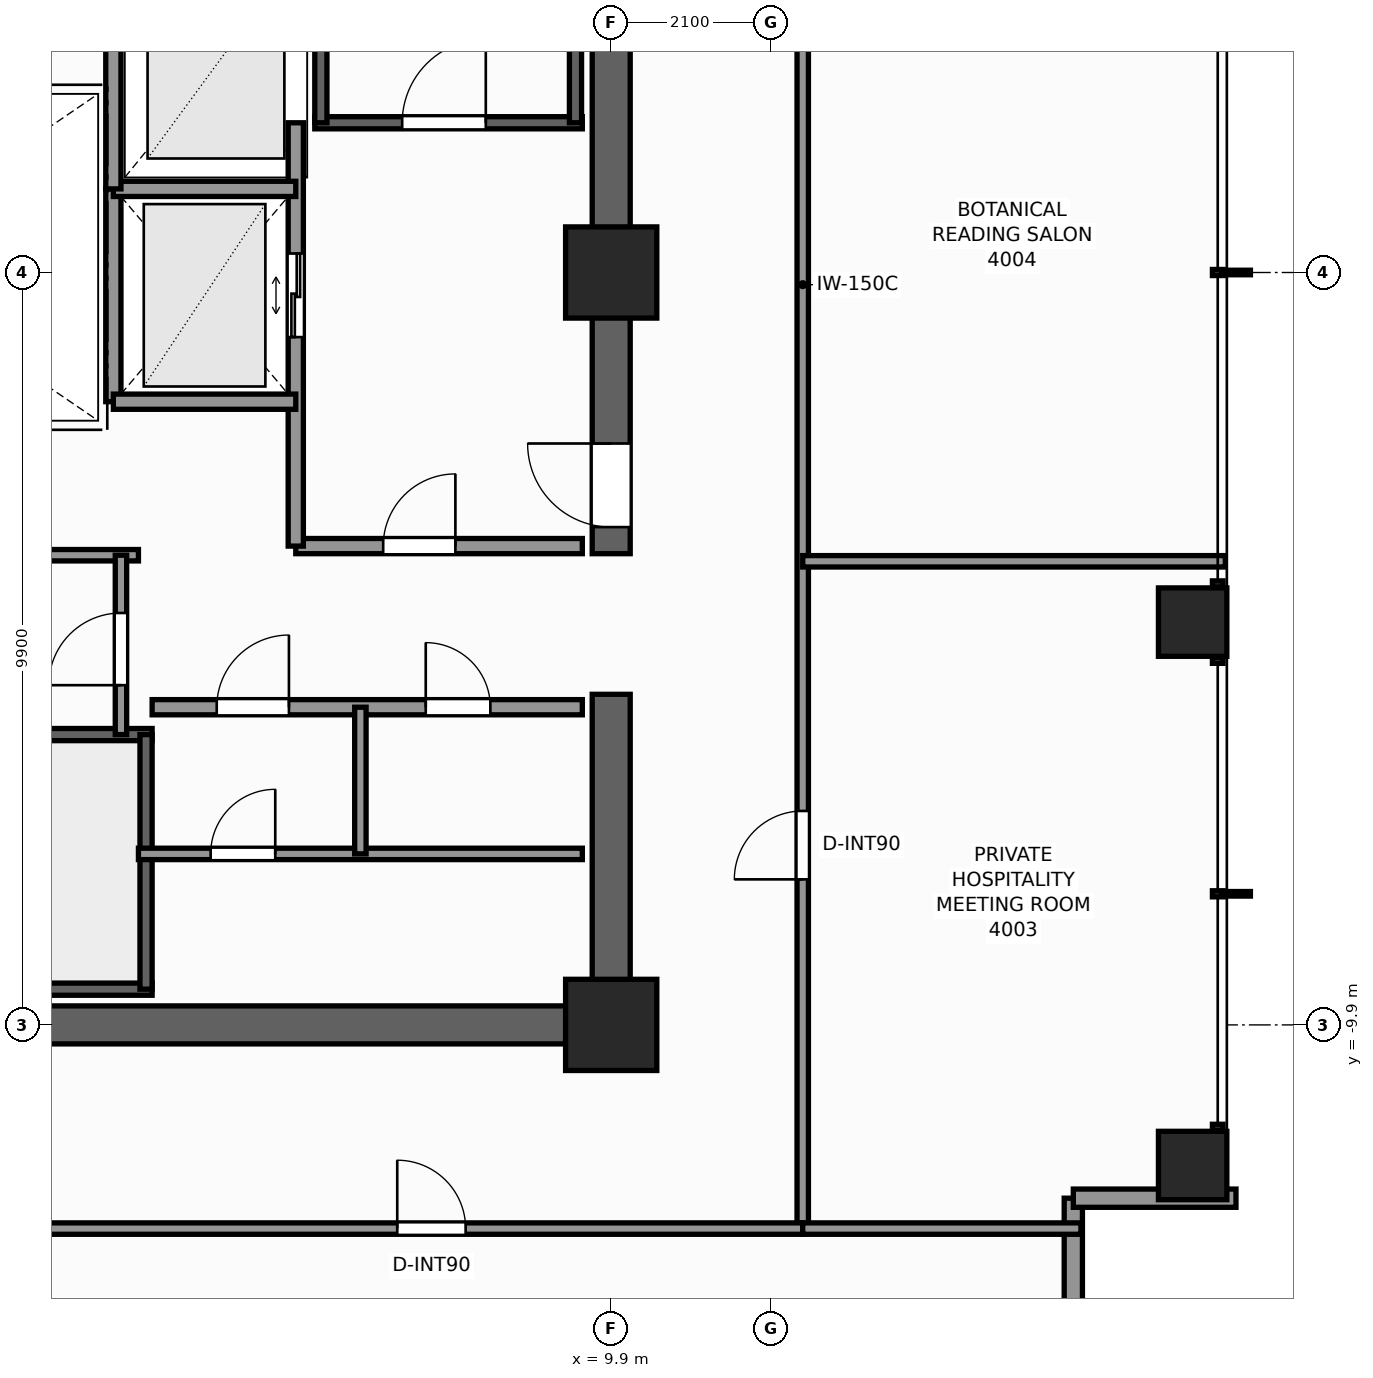
"""IFC4 building model, lengths in metres.
Left out: names, types, materials, properties, quantities, classifications, styles, units other than length and angle.
Written with IfcOpenShell. Run it as: python <this file> out.ifc"""

import sys

from ifc_helpers import new_model, si_unit, direction, frame, frame_2d, origin, origin_2d, place, context, subcontext, project, spatial, rectangle, extrude, element, fill, save


model = new_model("IFC4")
c1 = context("Model", 3, precision=1e-05, world=origin(), true_north=direction((0.0, 1.0)))
c2 = subcontext(c1, "Body", "Model", "MODEL_VIEW")
j1 = project(units=[si_unit("LENGTHUNIT", "METRE"), si_unit("PLANEANGLEUNIT", "RADIAN")], contexts=[c1])
p1 = place(None, origin())
s1 = spatial("IfcSite", under=j1, at=p1, CompositionType="ELEMENT")
p2 = place(p1, origin())
s2 = spatial("IfcBuilding", under=s1, at=p2, CompositionType="ELEMENT")
p3 = place(p2, frame((0.0, 0.0, 138.2)))
s3 = spatial("IfcBuildingStorey", under=s2, at=p3, CompositionType="ELEMENT", Elevation=138.2)
p4 = place(p3, frame((10.15, -9.9, 0.0), z_axis=(0.0, 0.0, 1.0), x_axis=(-1.0, 0.0, 0.0)))
e1 = element("IfcWall", 1, at=p4, inside=s3, PredefinedType="SHEAR", context=c2, shape_type="SweptSolid", body=[
    extrude(rectangle(XDim=12.01, YDim=0.5, at=frame_2d((6.005, 0.0))), origin(), (0.0, 0.0, 1.0), 3.3),
])
p5 = place(p3, frame((9.9, -9.65, 0.0), z_axis=(0.0, 0.0, 1.0), x_axis=(0.0, 1.0, 0.0)))
e2 = element("IfcWall", 2, at=p5, inside=s3, PredefinedType="SHEAR", context=c2, shape_type="SweptSolid", body=[
    extrude(rectangle(XDim=4.1, YDim=0.5, at=frame_2d((2.05, 0.0))), origin(), (0.0, 0.0, 1.0), 3.3),
])
p6 = place(p3, frame((9.9, -3.7, 0.0), z_axis=(0.0, 0.0, 1.0), x_axis=(0.0, 1.0, 0.0)))
e3 = element("IfcWall", 3, at=p6, inside=s3, PredefinedType="SHEAR", context=c2, shape_type="SweptSolid", body=[
    extrude(rectangle(XDim=13.35, YDim=0.5, at=frame_2d((6.675, 0.0))), origin(), (0.0, 0.0, 1.0), 3.3),
])
p7 = place(p6, frame((0.35, 0.0, 0.0)))
e4 = element("IfcOpeningElement", 4, at=p7, cuts=e3, PredefinedType="OPENING", context=c2, shape_type="SweptSolid", body=[
    extrude(rectangle(XDim=1.1, YDim=2.2, at=frame_2d((0.55, 1.1))), frame((0.0, 0.26, 0.0), z_axis=(0.0, -1.0, 0.0), x_axis=(1.0, 0.0, 0.0)), (0.0, 0.0, 1.0), 0.52),
])
for number, where, z_axis, x_axis in (
    (5, (9.9, -9.9, 0.0), (0.0, 0.0, 1.0), (1.0, 0.0, 0.0)),
    (6, (9.9, 0.0, 0.0), (0.0, 0.0, 1.0), (1.0, 0.0, 0.0)),
):
    element("IfcColumn", number, at=place(p3, frame(where, z_axis=z_axis, x_axis=x_axis)), inside=s3, PredefinedType="COLUMN", context=c2, shape_type="SweptSolid", body=[
        extrude(rectangle(XDim=1.2, YDim=1.2, at=origin_2d()), origin(), (0.0, 0.0, 1.0), 3.3),
    ])
for number, where, z_axis, x_axis in (
    (7, (17.55, -11.75, 0.0), (0.0, 0.0, 1.0), (1.0, 0.0, 0.0)),
    (8, (17.55, -4.6, 0.0), (0.0, 0.0, 1.0), (1.0, 0.0, 0.0)),
):
    element("IfcColumn", number, at=place(p3, frame(where, z_axis=z_axis, x_axis=x_axis)), inside=s3, PredefinedType="COLUMN", context=c2, shape_type="SweptSolid", body=[
        extrude(rectangle(XDim=0.9, YDim=0.9, at=origin_2d()), origin(), (0.0, 0.0, 1.0), 3.3),
    ])
for number, where, z_axis, x_axis in (
    (9, (15.98, -12.18, 0.0), (0.0, 0.0, 1.0), (0.0, -1.0, 0.0)),
    (10, (18.12, -12.18, 0.0), (0.0, 0.0, 1.0), (-1.0, 0.0, 0.0)),
):
    element("IfcWall", number, at=place(p3, frame(where, z_axis=z_axis, x_axis=x_axis)), inside=s3, PredefinedType="STANDARD", context=c2, shape_type="SweptSolid", body=[
        extrude(rectangle(XDim=2.14, YDim=0.24, at=frame_2d((1.07, 0.0))), origin(), (0.0, 0.0, 1.0), 2.479),
    ])
p8 = place(p3, frame((6.0, 1.97, 0.0), z_axis=(0.0, 0.0, 1.0), x_axis=(1.0, 0.0, 0.0)))
e11 = element("IfcWall", 11, at=p8, inside=s3, PredefinedType="SHEAR", context=c2, shape_type="SweptSolid", body=[
    extrude(rectangle(XDim=3.52, YDim=0.16, at=frame_2d((1.76, 0.0))), origin(), (0.0, 0.0, 1.0), 3.3),
])
p9 = place(p8, frame((1.15, 0.0, 0.0)))
e12 = element("IfcOpeningElement", 12, at=p9, cuts=e11, PredefinedType="OPENING", context=c2, shape_type="SweptSolid", body=[
    extrude(rectangle(XDim=1.1, YDim=2.2, at=frame_2d((0.55, 1.1))), frame((0.0, 0.09, 0.0), z_axis=(0.0, -1.0, 0.0), x_axis=(1.0, 0.0, 0.0)), (0.0, 0.0, 1.0), 0.18),
])
for number, where, z_axis, x_axis in (
    (13, (6.08, 1.97, 0.0), (0.0, 0.0, 1.0), (0.0, 1.0, 0.0)),
    (14, (9.43, 1.97, 0.0), (0.0, 0.0, 1.0), (0.0, 1.0, 0.0)),
):
    element("IfcWall", number, at=place(p3, frame(where, z_axis=z_axis, x_axis=x_axis)), inside=s3, PredefinedType="SHEAR", context=c2, shape_type="SweptSolid", body=[
        extrude(rectangle(XDim=7.56, YDim=0.16, at=frame_2d((3.78, 0.0))), origin(), (0.0, 0.0, 1.0), 3.3),
    ])
p10 = place(p3, frame((3.86, -9.43, 0.0), z_axis=(0.0, 0.0, 1.0), x_axis=(-1.0, 0.0, 0.0)))
e15 = element("IfcWall", 15, at=p10, inside=s3, PredefinedType="SHEAR", context=c2, shape_type="SweptSolid", body=[
    extrude(rectangle(XDim=7.72, YDim=0.16, at=frame_2d((3.86, 0.0))), origin(), (0.0, 0.0, 1.0), 3.3),
])
p11 = place(p10, frame((6.01, 0.0, 0.0)))
e16 = element("IfcOpeningElement", 16, at=p11, cuts=e15, PredefinedType="OPENING", context=c2, shape_type="SweptSolid", body=[
    extrude(rectangle(XDim=1.1, YDim=2.2, at=frame_2d((0.55, 1.1))), frame((0.0, 0.09, 0.0), z_axis=(0.0, -1.0, 0.0), x_axis=(1.0, 0.0, 0.0)), (0.0, 0.0, 1.0), 0.18),
])
p12 = place(p3, frame((-3.86, -6.08, 0.0), z_axis=(0.0, 0.0, 1.0), x_axis=(1.0, 0.0, 0.0)))
e17 = element("IfcWall", 17, at=p12, inside=s3, PredefinedType="SHEAR", context=c2, shape_type="SweptSolid", body=[
    extrude(rectangle(XDim=7.72, YDim=0.16, at=frame_2d((3.86, 0.0))), origin(), (0.0, 0.0, 1.0), 3.3),
])
p13 = place(p3, frame((3.78, -9.43, 0.0), z_axis=(0.0, 0.0, 1.0), x_axis=(0.0, 1.0, 0.0)))
e18 = element("IfcWall", 18, at=p13, inside=s3, PredefinedType="SHEAR", context=c2, shape_type="SweptSolid", body=[
    extrude(rectangle(XDim=3.35, YDim=0.16, at=frame_2d((1.675, 0.0))), origin(), (0.0, 0.0, 1.0), 3.3),
])
p14 = place(p3, frame((5.75, -3.6, 0.0), z_axis=(0.0, 0.0, 1.0), x_axis=(1.0, 0.0, 0.0)))
e19 = element("IfcWall", 19, at=p14, inside=s3, PredefinedType="SOLIDWALL", context=c2, shape_type="SweptSolid", body=[
    extrude(rectangle(XDim=3.77, YDim=0.2, at=frame_2d((1.885, 0.0))), origin(), (0.0, 0.0, 1.0), 3.1),
])
p15 = place(p14, frame((1.15, 0.0, 0.0)))
e20 = element("IfcOpeningElement", 20, at=p15, cuts=e19, PredefinedType="OPENING", context=c2, shape_type="SweptSolid", body=[
    extrude(rectangle(XDim=0.95, YDim=2.06, at=frame_2d((0.475, 1.03))), frame((0.0, 0.11, 0.0), z_axis=(0.0, -1.0, 0.0), x_axis=(1.0, 0.0, 0.0)), (0.0, 0.0, 1.0), 0.22),
])
p16 = place(p3, frame((5.75, -3.6, 0.0), z_axis=(0.0, 0.0, 1.0), x_axis=(0.0, 1.0, 0.0)))
e21 = element("IfcWall", 21, at=p16, inside=s3, PredefinedType="SOLIDWALL", context=c2, shape_type="SweptSolid", body=[
    extrude(rectangle(XDim=5.57, YDim=0.2, at=frame_2d((2.785, 0.0))), origin(), (0.0, 0.0, 1.0), 2.735),
])
p17 = place(p16, frame((2.75, 0.0, 0.0)))
e22 = element("IfcOpeningElement", 22, at=p17, cuts=e21, PredefinedType="OPENING", context=c2, shape_type="SweptSolid", body=[
    extrude(rectangle(XDim=1.1, YDim=2.2, at=frame_2d((0.55, 1.1))), frame((0.0, 0.11, 0.0), z_axis=(0.0, -1.0, 0.0), x_axis=(1.0, 0.0, 0.0)), (0.0, 0.0, 1.0), 0.22),
])
p18 = place(p3, frame((3.35, -1.7, 0.0), z_axis=(0.0, 0.0, 1.0), x_axis=(0.0, 1.0, 0.0)))
e23 = element("IfcWall", 23, at=p18, inside=s3, PredefinedType="SOLIDWALL", context=c2, shape_type="SweptSolid", body=[
    extrude(rectangle(XDim=2.8, YDim=0.2, at=frame_2d((1.4, 0.0))), origin(), (0.0, 0.0, 1.0), 2.735),
])
for number, where, z_axis, x_axis in (
    (24, (3.35, -1.7, 0.0), (0.0, 0.0, 1.0), (1.0, 0.0, 0.0)),
    (25, (3.35, 1.1, 0.0), (0.0, 0.0, 1.0), (1.0, 0.0, 0.0)),
):
    element("IfcWall", number, at=place(p3, frame(where, z_axis=z_axis, x_axis=x_axis)), inside=s3, PredefinedType="SOLIDWALL", context=c2, shape_type="SweptSolid", body=[
        extrude(rectangle(XDim=2.4, YDim=0.2, at=frame_2d((1.2, 0.0))), origin(), (0.0, 0.0, 1.0), 3.1),
    ])
p19 = place(p3, frame((3.35, 1.1, 0.0), z_axis=(0.0, 0.0, 1.0), x_axis=(0.0, 1.0, 0.0)))
e26 = element("IfcWall", 26, at=p19, inside=s3, PredefinedType="SOLIDWALL", context=c2, shape_type="SweptSolid", body=[
    extrude(rectangle(XDim=3.2, YDim=0.2, at=frame_2d((1.6, 0.0))), origin(), (0.0, 0.0, 1.0), 2.735),
])
p20 = place(p3, frame((3.86, -5.72, 0.0), z_axis=(0.0, 0.0, 1.0), x_axis=(1.0, 0.0, 0.0)))
e27 = element("IfcWall", 27, at=p20, inside=s3, PredefinedType="SOLIDWALL", context=c2, shape_type="SweptSolid", body=[
    extrude(rectangle(XDim=5.66, YDim=0.2, at=frame_2d((2.83, 0.0))), origin(), (0.0, 0.0, 1.0), 3.1),
])
p21 = place(p20, frame((0.85, 0.0, 0.0)))
e28 = element("IfcOpeningElement", 28, at=p21, cuts=e27, PredefinedType="OPENING", context=c2, shape_type="SweptSolid", body=[
    extrude(rectangle(XDim=0.95, YDim=2.06, at=frame_2d((0.475, 1.03))), frame((0.0, 0.11, 0.0), z_axis=(0.0, -1.0, 0.0), x_axis=(1.0, 0.0, 0.0)), (0.0, 0.0, 1.0), 0.22),
])
p22 = place(p20, frame((3.6, 0.0, 0.0)))
e29 = element("IfcOpeningElement", 29, at=p22, cuts=e27, PredefinedType="OPENING", context=c2, shape_type="SweptSolid", body=[
    extrude(rectangle(XDim=0.85, YDim=2.03, at=frame_2d((0.425, 1.015))), frame((0.0, 0.11, 0.0), z_axis=(0.0, -1.0, 0.0), x_axis=(1.0, 0.0, 0.0)), (0.0, 0.0, 1.0), 0.22),
])
p23 = place(p3, frame((3.68, -7.65, 0.0), z_axis=(0.0, 0.0, 1.0), x_axis=(1.0, 0.0, 0.0)))
e30 = element("IfcWall", 30, at=p23, inside=s3, PredefinedType="PARTITIONING", context=c2, shape_type="SweptSolid", body=[
    extrude(rectangle(XDim=5.84, YDim=0.15, at=frame_2d((2.92, 0.0))), origin(), (0.0, 0.0, 1.0), 3.1),
])
p24 = place(p23, frame((0.95, 0.0, 0.0)))
e31 = element("IfcOpeningElement", 31, at=p24, cuts=e30, PredefinedType="OPENING", context=c2, shape_type="SweptSolid", body=[
    extrude(rectangle(XDim=0.85, YDim=2.03, at=frame_2d((0.425, 1.015))), frame((0.0, 0.085, 0.0), z_axis=(0.0, -1.0, 0.0), x_axis=(1.0, 0.0, 0.0)), (0.0, 0.0, 1.0), 0.17),
])
p25 = place(p3, frame((6.6, -7.65, 0.0), z_axis=(0.0, 0.0, 1.0), x_axis=(0.0, 1.0, 0.0)))
e32 = element("IfcWall", 32, at=p25, inside=s3, PredefinedType="PARTITIONING", context=c2, shape_type="SweptSolid", body=[
    extrude(rectangle(XDim=1.93, YDim=0.15, at=frame_2d((0.965, 0.0))), origin(), (0.0, 0.0, 1.0), 3.1),
])
p26 = place(p3, frame((-3.68, -3.72, 0.0), z_axis=(0.0, 0.0, 1.0), x_axis=(1.0, 0.0, 0.0)))
e33 = element("IfcWall", 33, at=p26, inside=s3, PredefinedType="PARTITIONING", context=c2, shape_type="SweptSolid", body=[
    extrude(rectangle(XDim=7.36, YDim=0.15, at=frame_2d((3.68, 0.0))), origin(), (0.0, 0.0, 1.0), 3.1),
])
p27 = place(p3, frame((3.45, -6.08, 0.0), z_axis=(0.0, 0.0, 1.0), x_axis=(0.0, 1.0, 0.0)))
e34 = element("IfcWall", 34, at=p27, inside=s3, PredefinedType="PARTITIONING", context=c2, shape_type="SweptSolid", body=[
    extrude(rectangle(XDim=2.36, YDim=0.15, at=frame_2d((1.18, 0.0))), origin(), (0.0, 0.0, 1.0), 3.1),
])
p28 = place(p27, frame((0.65, 0.0, 0.0)))
e35 = element("IfcOpeningElement", 35, at=p28, cuts=e34, PredefinedType="OPENING", context=c2, shape_type="SweptSolid", body=[
    extrude(rectangle(XDim=0.95, YDim=2.06, at=frame_2d((0.475, 1.03))), frame((0.0, 0.085, 0.0), z_axis=(0.0, -1.0, 0.0), x_axis=(1.0, 0.0, 0.0)), (0.0, 0.0, 1.0), 0.17),
])
p29 = place(p3, frame((12.42, -12.58, 0.0), z_axis=(0.0, 0.0, 1.0), x_axis=(0.0, 1.0, 0.0)))
e36 = element("IfcWall", 36, at=p29, inside=s3, PredefinedType="PARTITIONING", context=c2, shape_type="SweptSolid", body=[
    extrude(rectangle(XDim=24.84, YDim=0.15, at=frame_2d((12.42, 0.0))), origin(), (0.0, 0.0, 1.0), 2.312),
])
p30 = place(p29, frame((4.595, 0.0, 0.0)))
e37 = element("IfcOpeningElement", 37, at=p30, cuts=e36, PredefinedType="OPENING", context=c2, shape_type="SweptSolid", body=[
    extrude(rectangle(XDim=0.9, YDim=2.06, at=frame_2d((0.45, 1.03))), frame((0.0, 0.085, 0.0), z_axis=(0.0, -1.0, 0.0), x_axis=(1.0, 0.0, 0.0)), (0.0, 0.0, 1.0), 0.17),
])
p31 = place(p29, frame((19.665, 0.0, 0.0)))
e38 = element("IfcOpeningElement", 38, at=p31, cuts=e36, PredefinedType="OPENING", context=c2, shape_type="SweptSolid", body=[
    extrude(rectangle(XDim=0.9, YDim=2.06, at=frame_2d((0.45, 1.03))), frame((0.0, 0.085, 0.0), z_axis=(0.0, -1.0, 0.0), x_axis=(1.0, 0.0, 0.0)), (0.0, 0.0, 1.0), 0.17),
])
p32 = place(p3, frame((-3.65, -12.58, 0.0), z_axis=(0.0, 0.0, 1.0), x_axis=(1.0, 0.0, 0.0)))
e39 = element("IfcWall", 39, at=p32, inside=s3, PredefinedType="PARTITIONING", context=c2, shape_type="SweptSolid", body=[
    extrude(rectangle(XDim=16.07, YDim=0.15, at=frame_2d((8.035, 0.0))), origin(), (0.0, 0.0, 1.0), 2.312),
])
p33 = place(p32, frame((10.735, 0.0, 0.0)))
e40 = element("IfcOpeningElement", 40, at=p33, cuts=e39, PredefinedType="OPENING", context=c2, shape_type="SweptSolid", body=[
    extrude(rectangle(XDim=0.9, YDim=2.06, at=frame_2d((0.45, 1.03))), frame((0.0, 0.085, 0.0), z_axis=(0.0, -1.0, 0.0), x_axis=(1.0, 0.0, 0.0)), (0.0, 0.0, 1.0), 0.17),
])
p34 = place(p3, frame((12.42, -12.58, 0.0), z_axis=(0.0, 0.0, 1.0), x_axis=(1.0, 0.0, 0.0)))
e41 = element("IfcWall", 41, at=p34, inside=s3, PredefinedType="PARTITIONING", context=c2, shape_type="SweptSolid", body=[
    extrude(rectangle(XDim=3.66, YDim=0.15, at=frame_2d((1.83, 0.0))), origin(), (0.0, 0.0, 1.0), 3.1),
])
p35 = place(p3, frame((12.42, -3.8, 0.0), z_axis=(0.0, 0.0, 1.0), x_axis=(1.0, 0.0, 0.0)))
e42 = element("IfcWall", 42, at=p35, inside=s3, PredefinedType="PARTITIONING", context=c2, shape_type="SweptSolid", body=[
    extrude(rectangle(XDim=5.56, YDim=0.15, at=frame_2d((2.78, 0.0))), origin(), (0.0, 0.0, 1.0), 2.469),
])
p36 = place(p9, origin())
e43 = element("IfcDoor", 43, at=p36, inside=s3, OperationType="SINGLE_SWING_RIGHT", PredefinedType="DOOR", context=c2, shape_type="SweptSolid", body=[
    extrude(rectangle(XDim=1.1, YDim=2.2, at=frame_2d((0.55, 1.1))), frame((0.0, 0.025, 0.0), z_axis=(0.0, -1.0, 0.0), x_axis=(1.0, 0.0, 0.0)), (0.0, 0.0, 1.0), 0.05),
])
fill(e12, e43)
p37 = place(p7, origin())
e44 = element("IfcDoor", 44, at=p37, inside=s3, OperationType="SINGLE_SWING_RIGHT", PredefinedType="DOOR", context=c2, shape_type="SweptSolid", body=[
    extrude(rectangle(XDim=1.1, YDim=2.2, at=frame_2d((0.55, 1.1))), frame((0.0, 0.025, 0.0), z_axis=(0.0, -1.0, 0.0), x_axis=(1.0, 0.0, 0.0)), (0.0, 0.0, 1.0), 0.05),
])
fill(e4, e44)
p38 = place(p17, origin())
e45 = element("IfcDoor", 45, at=p38, inside=s3, OperationType="DOUBLE_DOOR_SLIDING", PredefinedType="DOOR", context=c2, shape_type="SweptSolid", body=[
    extrude(rectangle(XDim=1.1, YDim=2.2, at=frame_2d((0.55, 1.1))), frame((0.0, 0.025, 0.0), z_axis=(0.0, -1.0, 0.0), x_axis=(1.0, 0.0, 0.0)), (0.0, 0.0, 1.0), 0.05),
])
fill(e22, e45)
p39 = place(p21, origin())
e46 = element("IfcDoor", 46, at=p39, inside=s3, OperationType="SINGLE_SWING_RIGHT", PredefinedType="DOOR", context=c2, shape_type="SweptSolid", body=[
    extrude(rectangle(XDim=0.95, YDim=2.06, at=frame_2d((0.475, 1.03))), frame((0.0, 0.025, 0.0), z_axis=(0.0, -1.0, 0.0), x_axis=(1.0, 0.0, 0.0)), (0.0, 0.0, 1.0), 0.05),
])
fill(e28, e46)
p40 = place(p22, origin())
e47 = element("IfcDoor", 47, at=p40, inside=s3, OperationType="SINGLE_SWING_LEFT", PredefinedType="DOOR", context=c2, shape_type="SweptSolid", body=[
    extrude(rectangle(XDim=0.85, YDim=2.03, at=frame_2d((0.425, 1.015))), frame((0.0, 0.025, 0.0), z_axis=(0.0, -1.0, 0.0), x_axis=(1.0, 0.0, 0.0)), (0.0, 0.0, 1.0), 0.05),
])
fill(e29, e47)
p41 = place(p24, origin())
e48 = element("IfcDoor", 48, at=p41, inside=s3, OperationType="SINGLE_SWING_RIGHT", PredefinedType="DOOR", context=c2, shape_type="SweptSolid", body=[
    extrude(rectangle(XDim=0.85, YDim=2.03, at=frame_2d((0.425, 1.015))), frame((0.0, 0.025, 0.0), z_axis=(0.0, -1.0, 0.0), x_axis=(1.0, 0.0, 0.0)), (0.0, 0.0, 1.0), 0.05),
])
fill(e31, e48)
p42 = place(p15, origin())
e49 = element("IfcDoor", 49, at=p42, inside=s3, OperationType="SINGLE_SWING_RIGHT", PredefinedType="DOOR", context=c2, shape_type="SweptSolid", body=[
    extrude(rectangle(XDim=0.95, YDim=2.06, at=frame_2d((0.475, 1.03))), frame((0.0, 0.025, 0.0), z_axis=(0.0, -1.0, 0.0), x_axis=(1.0, 0.0, 0.0)), (0.0, 0.0, 1.0), 0.05),
])
fill(e20, e49)
p43 = place(p28, origin())
e50 = element("IfcDoor", 50, at=p43, inside=s3, OperationType="SINGLE_SWING_LEFT", PredefinedType="DOOR", context=c2, shape_type="SweptSolid", body=[
    extrude(rectangle(XDim=0.95, YDim=2.06, at=frame_2d((0.475, 1.03))), frame((0.0, 0.025, 0.0), z_axis=(0.0, -1.0, 0.0), x_axis=(1.0, 0.0, 0.0)), (0.0, 0.0, 1.0), 0.05),
])
fill(e35, e50)
p44 = place(p30, origin())
e51 = element("IfcDoor", 51, at=p44, inside=s3, OperationType="SINGLE_SWING_LEFT", PredefinedType="DOOR", context=c2, shape_type="SweptSolid", body=[
    extrude(rectangle(XDim=0.9, YDim=2.06, at=frame_2d((0.45, 1.03))), frame((0.0, 0.025, 0.0), z_axis=(0.0, -1.0, 0.0), x_axis=(1.0, 0.0, 0.0)), (0.0, 0.0, 1.0), 0.05),
])
fill(e37, e51)
p45 = place(p33, origin())
e52 = element("IfcDoor", 52, at=p45, inside=s3, OperationType="SINGLE_SWING_LEFT", PredefinedType="DOOR", context=c2, shape_type="SweptSolid", body=[
    extrude(rectangle(XDim=0.9, YDim=2.06, at=frame_2d((0.45, 1.03))), frame((0.0, 0.025, 0.0), z_axis=(0.0, -1.0, 0.0), x_axis=(1.0, 0.0, 0.0)), (0.0, 0.0, 1.0), 0.05),
])
fill(e40, e52)
save(model, sys.argv[1])
